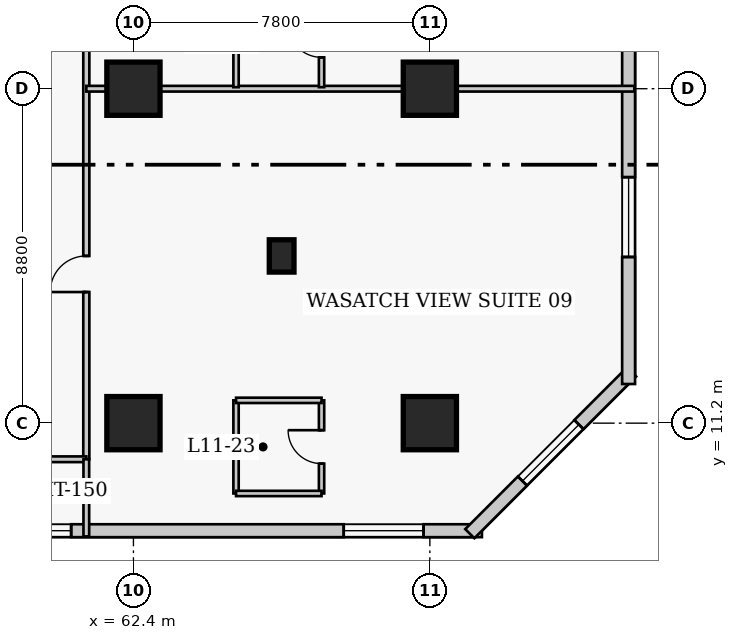
"""IFC4 building model, lengths in metres.
Left out: names, types, materials, properties, quantities, classifications, styles, units other than length and angle.
Written with IfcOpenShell. Run it as: python <this file> out.ifc"""

import sys

from ifc_helpers import new_model, si_unit, direction, frame, frame_2d, origin, origin_2d, place, context, subcontext, project, spatial, rectangle, extrude, element, fill, save


model = new_model("IFC4")
c1 = context("Model", 3, precision=1e-05, world=origin(), true_north=direction((0.0, 1.0)))
c2 = subcontext(c1, "Body", "Model", "MODEL_VIEW")
j1 = project(units=[si_unit("LENGTHUNIT", "METRE"), si_unit("PLANEANGLEUNIT", "RADIAN")], contexts=[c1])
p1 = place(None, origin())
s1 = spatial("IfcSite", under=j1, at=p1, CompositionType="ELEMENT")
p2 = place(p1, origin())
s2 = spatial("IfcBuilding", under=s1, at=p2, CompositionType="ELEMENT")
p3 = place(p2, frame((0.0, 0.0, 48.8)))
s3 = spatial("IfcBuildingStorey", under=s2, at=p3, CompositionType="ELEMENT", Elevation=48.8)
for number, where, z_axis, x_axis in (
    (1, (62.4, 11.2, 0.0), (0.0, 0.0, 1.0), (1.0, 0.0, 0.0)),
    (2, (62.4, 20.0, 0.0), (0.0, 0.0, 1.0), (1.0, 0.0, 0.0)),
    (3, (70.2, 11.2, 0.0), (0.0, 0.0, 1.0), (1.0, 0.0, 0.0)),
    (4, (70.2, 20.0, 0.0), (0.0, 0.0, 1.0), (1.0, 0.0, 0.0)),
):
    element("IfcColumn", number, at=place(p3, frame(where, z_axis=z_axis, x_axis=x_axis)), inside=s3, PredefinedType="COLUMN", context=c2, shape_type="SweptSolid", body=[
        extrude(rectangle(XDim=1.4, YDim=1.4, at=origin_2d()), origin(), (0.0, 0.0, 1.0), 3.8),
    ])
p4 = place(p3, frame((66.3, 15.6, 0.0), z_axis=(0.0, 0.0, 1.0), x_axis=(1.0, 0.0, 0.0)))
e5 = element("IfcColumn", 5, at=p4, inside=s3, PredefinedType="PILASTER", context=c2, shape_type="SweptSolid", body=[
    extrude(rectangle(XDim=0.65, YDim=0.85, at=origin_2d()), origin(), (0.0, 0.0, 1.0), 3.8),
])
p5 = place(p3, frame((41.68, 8.37, 0.0), z_axis=(0.0, 0.0, 1.0), x_axis=(1.0, 0.0, 0.0)))
e6 = element("IfcWall", 6, at=p5, inside=s3, PredefinedType="SOLIDWALL", context=c2, shape_type="SweptSolid", body=[
    extrude(rectangle(XDim=29.89, YDim=0.34, at=frame_2d((14.945, 0.0))), origin(), (0.0, 0.0, 1.0), 3.54),
])
p6 = place(p5, frame((16.981, 0.0, 0.85)))
e7 = element("IfcOpeningElement", 7, at=p6, cuts=e6, PredefinedType="OPENING", context=c2, shape_type="SweptSolid", body=[
    extrude(rectangle(XDim=2.1, YDim=1.85, at=frame_2d((1.05, 0.925))), frame((0.0, 0.18, 0.0), z_axis=(0.0, -1.0, 0.0), x_axis=(1.0, 0.0, 0.0)), (0.0, 0.0, 1.0), 0.36),
])
p7 = place(p5, frame((26.254, 0.0, 0.85)))
e8 = element("IfcOpeningElement", 8, at=p7, cuts=e6, PredefinedType="OPENING", context=c2, shape_type="SweptSolid", body=[
    extrude(rectangle(XDim=2.1, YDim=1.85, at=frame_2d((1.05, 0.925))), frame((0.0, 0.18, 0.0), z_axis=(0.0, -1.0, 0.0), x_axis=(1.0, 0.0, 0.0)), (0.0, 0.0, 1.0), 0.36),
])
p8 = place(p5, frame((6.15, 0.0, 0.85)))
e9 = element("IfcOpeningElement", 9, at=p8, cuts=e6, PredefinedType="OPENING", context=c2, shape_type="SweptSolid", body=[
    extrude(rectangle(XDim=1.3, YDim=1.7, at=frame_2d((0.65, 0.85))), frame((0.0, 0.18, 0.0), z_axis=(0.0, -1.0, 0.0), x_axis=(1.0, 0.0, 0.0)), (0.0, 0.0, 1.0), 0.36),
])
p9 = place(p5, frame((13.763, 0.0, 0.85)))
e10 = element("IfcOpeningElement", 10, at=p9, cuts=e6, PredefinedType="OPENING", context=c2, shape_type="SweptSolid", body=[
    extrude(rectangle(XDim=1.3, YDim=1.7, at=frame_2d((0.65, 0.85))), frame((0.0, 0.18, 0.0), z_axis=(0.0, -1.0, 0.0), x_axis=(1.0, 0.0, 0.0)), (0.0, 0.0, 1.0), 0.36),
])
p10 = place(p3, frame((71.251, 8.292, 0.0), z_axis=(0.0, 0.0, 1.0), x_axis=(0.707106781187, 0.707106781187, 0.0)))
e11 = element("IfcWall", 11, at=p10, inside=s3, PredefinedType="SOLIDWALL", context=c2, shape_type="SweptSolid", body=[
    extrude(rectangle(XDim=6.02, YDim=0.34, at=frame_2d((3.01, 0.0))), origin(), (0.0, 0.0, 1.0), 3.54),
])
p11 = place(p10, frame((1.96, 0.0, 0.85)))
e12 = element("IfcOpeningElement", 12, at=p11, cuts=e11, PredefinedType="OPENING", context=c2, shape_type="SweptSolid", body=[
    extrude(rectangle(XDim=2.1, YDim=1.85, at=frame_2d((1.05, 0.925))), frame((0.0, 0.18, 0.0), z_axis=(0.0, -1.0, 0.0), x_axis=(1.0, 0.0, 0.0)), (0.0, 0.0, 1.0), 0.36),
])
p12 = place(p3, frame((75.43, 12.23, 0.0), z_axis=(0.0, 0.0, 1.0), x_axis=(0.0, 1.0, 0.0)))
e13 = element("IfcWall", 13, at=p12, inside=s3, PredefinedType="SOLIDWALL", context=c2, shape_type="SweptSolid", body=[
    extrude(rectangle(XDim=35.14, YDim=0.34, at=frame_2d((17.57, 0.0))), origin(), (0.0, 0.0, 1.0), 3.54),
])
p13 = place(p12, frame((3.343, 0.0, 0.85)))
e14 = element("IfcOpeningElement", 14, at=p13, cuts=e13, PredefinedType="OPENING", context=c2, shape_type="SweptSolid", body=[
    extrude(rectangle(XDim=2.1, YDim=1.85, at=frame_2d((1.05, 0.925))), frame((0.0, 0.18, 0.0), z_axis=(0.0, -1.0, 0.0), x_axis=(1.0, 0.0, 0.0)), (0.0, 0.0, 1.0), 0.36),
])
p14 = place(p12, frame((12.127, 0.0, 0.85)))
e15 = element("IfcOpeningElement", 15, at=p14, cuts=e13, PredefinedType="OPENING", context=c2, shape_type="SweptSolid", body=[
    extrude(rectangle(XDim=2.1, YDim=1.85, at=frame_2d((1.05, 0.925))), frame((0.0, 0.18, 0.0), z_axis=(0.0, -1.0, 0.0), x_axis=(1.0, 0.0, 0.0)), (0.0, 0.0, 1.0), 0.36),
])
p15 = place(p12, frame((20.913, 0.0, 0.85)))
e16 = element("IfcOpeningElement", 16, at=p15, cuts=e13, PredefinedType="OPENING", context=c2, shape_type="SweptSolid", body=[
    extrude(rectangle(XDim=2.1, YDim=1.85, at=frame_2d((1.05, 0.925))), frame((0.0, 0.18, 0.0), z_axis=(0.0, -1.0, 0.0), x_axis=(1.0, 0.0, 0.0)), (0.0, 0.0, 1.0), 0.36),
])
p16 = place(p12, frame((29.698, 0.0, 0.85)))
e17 = element("IfcOpeningElement", 17, at=p16, cuts=e13, PredefinedType="OPENING", context=c2, shape_type="SweptSolid", body=[
    extrude(rectangle(XDim=2.1, YDim=1.85, at=frame_2d((1.05, 0.925))), frame((0.0, 0.18, 0.0), z_axis=(0.0, -1.0, 0.0), x_axis=(1.0, 0.0, 0.0)), (0.0, 0.0, 1.0), 0.36),
])
p17 = place(p3, frame((61.16, 10.25, 0.0), z_axis=(0.0, 0.0, 1.0), x_axis=(0.0, 1.0, 0.0)))
e18 = element("IfcWall", 18, at=p17, inside=s3, PredefinedType="PARTITIONING", context=c2, shape_type="SweptSolid", body=[
    extrude(rectangle(XDim=30.4, YDim=0.16, at=frame_2d((15.2, 0.0))), origin(), (0.0, 0.0, 1.0), 3.54),
])
p18 = place(p17, frame((4.4, 0.0, 0.0)))
e19 = element("IfcOpeningElement", 19, at=p18, cuts=e18, PredefinedType="OPENING", context=c2, shape_type="SweptSolid", body=[
    extrude(rectangle(XDim=0.95, YDim=2.1, at=frame_2d((0.475, 1.05))), frame((0.0, 0.09, 0.0), z_axis=(0.0, -1.0, 0.0), x_axis=(1.0, 0.0, 0.0)), (0.0, 0.0, 1.0), 0.18),
])
p19 = place(p17, frame((13.675, 0.0, 0.0)))
e20 = element("IfcOpeningElement", 20, at=p19, cuts=e18, PredefinedType="OPENING", context=c2, shape_type="SweptSolid", body=[
    extrude(rectangle(XDim=0.95, YDim=2.1, at=frame_2d((0.475, 1.05))), frame((0.0, 0.09, 0.0), z_axis=(0.0, -1.0, 0.0), x_axis=(1.0, 0.0, 0.0)), (0.0, 0.0, 1.0), 0.18),
])
p20 = place(p17, frame((21.8, 0.0, 0.0)))
e21 = element("IfcOpeningElement", 21, at=p20, cuts=e18, PredefinedType="OPENING", context=c2, shape_type="SweptSolid", body=[
    extrude(rectangle(XDim=0.95, YDim=2.1, at=frame_2d((0.475, 1.05))), frame((0.0, 0.09, 0.0), z_axis=(0.0, -1.0, 0.0), x_axis=(1.0, 0.0, 0.0)), (0.0, 0.0, 1.0), 0.18),
])
p21 = place(p17, frame((28.96, 0.0, 0.0)))
e22 = element("IfcOpeningElement", 22, at=p21, cuts=e18, PredefinedType="OPENING", context=c2, shape_type="SweptSolid", body=[
    extrude(rectangle(XDim=1.0, YDim=2.15, at=frame_2d((0.5, 1.075))), frame((0.0, 0.09, 0.0), z_axis=(0.0, -1.0, 0.0), x_axis=(1.0, 0.0, 0.0)), (0.0, 0.0, 1.0), 0.18),
])
p22 = place(p3, frame((58.94, 10.25, 0.0), z_axis=(0.0, 0.0, 1.0), x_axis=(1.0, 0.0, 0.0)))
e23 = element("IfcWall", 23, at=p22, inside=s3, PredefinedType="PARTITIONING", context=c2, shape_type="SweptSolid", body=[
    extrude(rectangle(XDim=2.22, YDim=0.15, at=frame_2d((1.11, 0.0))), origin(), (0.0, 0.0, 1.0), 3.54),
])
p23 = place(p3, frame((61.16, 8.22, 0.0), z_axis=(0.0, 0.0, 1.0), x_axis=(0.0, 1.0, 0.0)))
e24 = element("IfcWall", 24, at=p23, inside=s3, PredefinedType="PARTITIONING", context=c2, shape_type="SweptSolid", body=[
    extrude(rectangle(XDim=2.03, YDim=0.15, at=frame_2d((1.015, 0.0))), origin(), (0.0, 0.0, 1.0), 3.54),
])
p24 = place(p3, frame((65.1, 9.35, 0.0), z_axis=(0.0, 0.0, 1.0), x_axis=(0.0, 1.0, 0.0)))
e25 = element("IfcWall", 25, at=p24, inside=s3, PredefinedType="PLUMBINGWALL", context=c2, shape_type="SweptSolid", body=[
    extrude(rectangle(XDim=2.45, YDim=0.14, at=frame_2d((1.225, 0.0))), origin(), (0.0, 0.0, 1.0), 3.54),
])
p25 = place(p3, frame((67.35, 9.35, 0.0), z_axis=(0.0, 0.0, 1.0), x_axis=(0.0, 1.0, 0.0)))
e26 = element("IfcWall", 26, at=p25, inside=s3, PredefinedType="PLUMBINGWALL", context=c2, shape_type="SweptSolid", body=[
    extrude(rectangle(XDim=2.45, YDim=0.14, at=frame_2d((1.225, 0.0))), origin(), (0.0, 0.0, 1.0), 3.54),
])
p26 = place(p25, frame((0.785, 0.0, 0.0)))
e27 = element("IfcOpeningElement", 27, at=p26, cuts=e26, PredefinedType="OPENING", context=c2, shape_type="SweptSolid", body=[
    extrude(rectangle(XDim=0.88, YDim=2.05, at=frame_2d((0.44, 1.025))), frame((0.0, 0.08, 0.0), z_axis=(0.0, -1.0, 0.0), x_axis=(1.0, 0.0, 0.0)), (0.0, 0.0, 1.0), 0.16),
])
for number, where, z_axis, x_axis in (
    (28, (65.1, 9.35, 0.0), (0.0, 0.0, 1.0), (1.0, 0.0, 0.0)),
    (29, (65.1, 11.8, 0.0), (0.0, 0.0, 1.0), (1.0, 0.0, 0.0)),
):
    element("IfcWall", number, at=place(p3, frame(where, z_axis=z_axis, x_axis=x_axis)), inside=s3, PredefinedType="PLUMBINGWALL", context=c2, shape_type="SweptSolid", body=[
        extrude(rectangle(XDim=2.25, YDim=0.14, at=frame_2d((1.125, 0.0))), origin(), (0.0, 0.0, 1.0), 3.54),
    ])
p27 = place(p3, frame((61.16, 20.0, 0.0), z_axis=(0.0, 0.0, 1.0), x_axis=(1.0, 0.0, 0.0)))
e30 = element("IfcWall", 30, at=p27, inside=s3, PredefinedType="PARTITIONING", context=c2, shape_type="SweptSolid", body=[
    extrude(rectangle(XDim=14.42, YDim=0.15, at=frame_2d((7.21, 0.0))), origin(), (0.0, 0.0, 1.0), 2.593),
])
p28 = place(p3, frame((65.1, 20.04, 0.0), z_axis=(0.0, 0.0, 1.0), x_axis=(0.0, 1.0, 0.0)))
e31 = element("IfcWall", 31, at=p28, inside=s3, PredefinedType="PLUMBINGWALL", context=c2, shape_type="SweptSolid", body=[
    extrude(rectangle(XDim=2.45, YDim=0.14, at=frame_2d((1.225, 0.0))), origin(), (0.0, 0.0, 1.0), 3.54),
])
p29 = place(p3, frame((67.35, 20.04, 0.0), z_axis=(0.0, 0.0, 1.0), x_axis=(0.0, 1.0, 0.0)))
e32 = element("IfcWall", 32, at=p29, inside=s3, PredefinedType="PLUMBINGWALL", context=c2, shape_type="SweptSolid", body=[
    extrude(rectangle(XDim=2.45, YDim=0.14, at=frame_2d((1.225, 0.0))), origin(), (0.0, 0.0, 1.0), 3.54),
])
p30 = place(p29, frame((0.785, 0.0, 0.0)))
e33 = element("IfcOpeningElement", 33, at=p30, cuts=e32, PredefinedType="OPENING", context=c2, shape_type="SweptSolid", body=[
    extrude(rectangle(XDim=0.88, YDim=2.05, at=frame_2d((0.44, 1.025))), frame((0.0, 0.08, 0.0), z_axis=(0.0, -1.0, 0.0), x_axis=(1.0, 0.0, 0.0)), (0.0, 0.0, 1.0), 0.16),
])
p31 = place(p6, origin())
e34 = element("IfcWindow", 34, at=p31, inside=s3, PartitioningType="SINGLE_PANEL", PredefinedType="WINDOW", context=c2, shape_type="SweptSolid", body=[
    extrude(rectangle(XDim=2.1, YDim=1.85, at=frame_2d((1.05, 0.925))), frame((0.0, 0.03, 0.0), z_axis=(0.0, -1.0, 0.0), x_axis=(1.0, 0.0, 0.0)), (0.0, 0.0, 1.0), 0.06),
])
fill(e7, e34)
p32 = place(p7, origin())
e35 = element("IfcWindow", 35, at=p32, inside=s3, PartitioningType="SINGLE_PANEL", PredefinedType="WINDOW", context=c2, shape_type="SweptSolid", body=[
    extrude(rectangle(XDim=2.1, YDim=1.85, at=frame_2d((1.05, 0.925))), frame((0.0, 0.03, 0.0), z_axis=(0.0, -1.0, 0.0), x_axis=(1.0, 0.0, 0.0)), (0.0, 0.0, 1.0), 0.06),
])
fill(e8, e35)
p33 = place(p11, origin())
e36 = element("IfcWindow", 36, at=p33, inside=s3, PartitioningType="SINGLE_PANEL", PredefinedType="WINDOW", context=c2, shape_type="SweptSolid", body=[
    extrude(rectangle(XDim=2.1, YDim=1.85, at=frame_2d((1.05, 0.925))), frame((0.0, 0.03, 0.0), z_axis=(0.0, -1.0, 0.0), x_axis=(1.0, 0.0, 0.0)), (0.0, 0.0, 1.0), 0.06),
])
fill(e12, e36)
p34 = place(p13, origin())
e37 = element("IfcWindow", 37, at=p34, inside=s3, PartitioningType="SINGLE_PANEL", PredefinedType="WINDOW", context=c2, shape_type="SweptSolid", body=[
    extrude(rectangle(XDim=2.1, YDim=1.85, at=frame_2d((1.05, 0.925))), frame((0.0, 0.03, 0.0), z_axis=(0.0, -1.0, 0.0), x_axis=(1.0, 0.0, 0.0)), (0.0, 0.0, 1.0), 0.06),
])
fill(e14, e37)
p35 = place(p26, origin())
e38 = element("IfcDoor", 38, at=p35, inside=s3, OperationType="SINGLE_SWING_RIGHT", PredefinedType="DOOR", context=c2, shape_type="SweptSolid", body=[
    extrude(rectangle(XDim=0.88, YDim=2.05, at=frame_2d((0.44, 1.025))), frame((0.0, 0.025, 0.0), z_axis=(0.0, -1.0, 0.0), x_axis=(1.0, 0.0, 0.0)), (0.0, 0.0, 1.0), 0.05),
])
fill(e27, e38)
p36 = place(p18, origin())
e39 = element("IfcDoor", 39, at=p36, inside=s3, OperationType="SINGLE_SWING_LEFT", PredefinedType="DOOR", context=c2, shape_type="SweptSolid", body=[
    extrude(rectangle(XDim=0.95, YDim=2.1, at=frame_2d((0.475, 1.05))), frame((0.0, 0.025, 0.0), z_axis=(0.0, -1.0, 0.0), x_axis=(1.0, 0.0, 0.0)), (0.0, 0.0, 1.0), 0.05),
])
fill(e19, e39)
p37 = place(p30, origin())
e40 = element("IfcDoor", 40, at=p37, inside=s3, OperationType="SINGLE_SWING_RIGHT", PredefinedType="DOOR", context=c2, shape_type="SweptSolid", body=[
    extrude(rectangle(XDim=0.88, YDim=2.05, at=frame_2d((0.44, 1.025))), frame((0.0, 0.025, 0.0), z_axis=(0.0, -1.0, 0.0), x_axis=(1.0, 0.0, 0.0)), (0.0, 0.0, 1.0), 0.05),
])
fill(e33, e40)
save(model, sys.argv[1])
